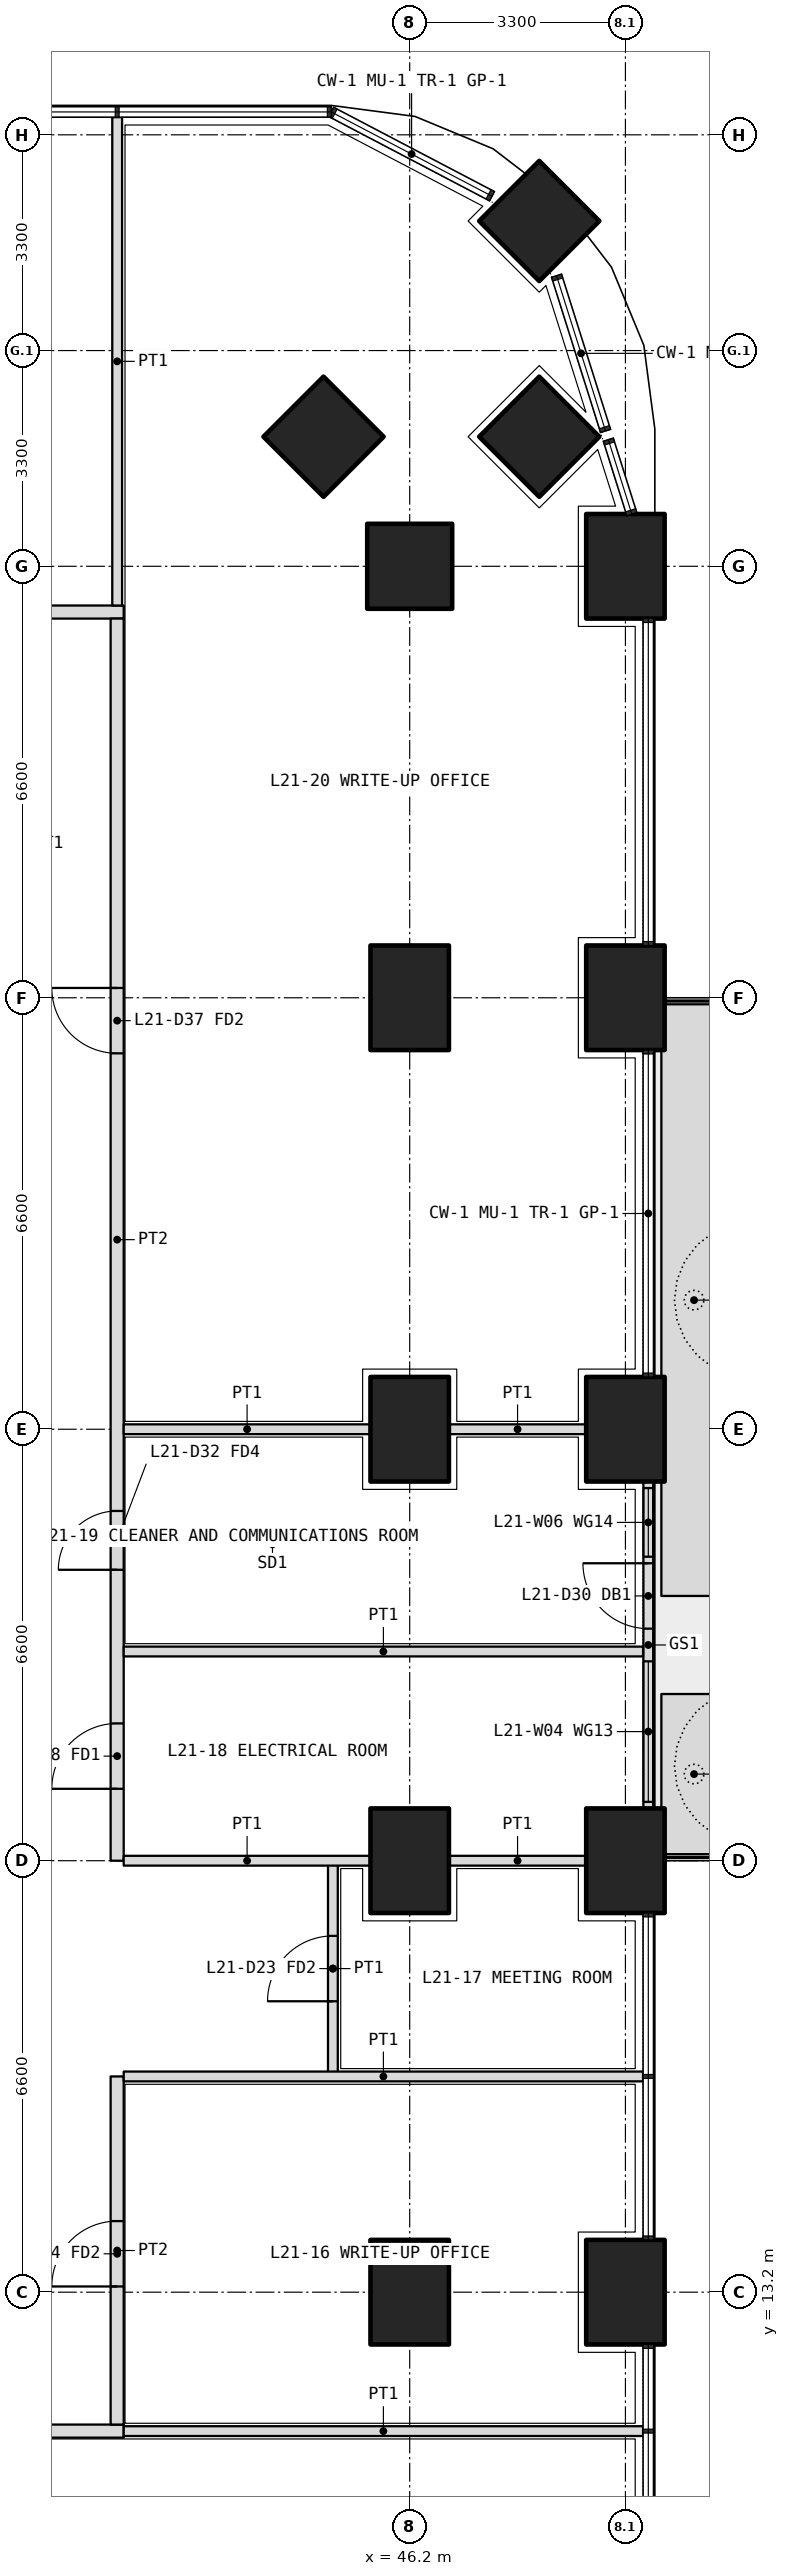
"""IFC4 building model, lengths in metres.
Left out: names, types, materials, properties, quantities, classifications, styles, units other than length and angle.
Written with IfcOpenShell. Run it as: python <this file> out.ifc"""

import sys

from ifc_helpers import new_model, si_unit, direction, frame, frame_2d, origin, origin_2d, place, context, subcontext, project, spatial, polyline, rectangle, outline, extrude, element, fill, save


model = new_model("IFC4")
c1 = context("Model", 3, precision=1e-05, world=origin(), true_north=direction((0.0, 1.0)))
c2 = subcontext(c1, "Body", "Model", "MODEL_VIEW")
j1 = project(units=[si_unit("LENGTHUNIT", "METRE"), si_unit("PLANEANGLEUNIT", "RADIAN")], contexts=[c1])
p1 = place(None, origin())
s1 = spatial("IfcSite", under=j1, at=p1, CompositionType="ELEMENT")
p2 = place(p1, origin())
s2 = spatial("IfcBuilding", under=s1, at=p2, CompositionType="ELEMENT")
p3 = place(p2, frame((0.0, 0.0, 94.8)))
s3 = spatial("IfcBuildingStorey", under=s2, at=p3, CompositionType="ELEMENT", Elevation=94.8)
p4 = place(p3, frame((48.182, 44.882, 0.0), z_axis=(0.0, 0.0, 1.0), x_axis=(0.707106781187, 0.707106781187, 0.0)))
e1 = element("IfcColumn", 1, at=p4, inside=s3, PredefinedType="COLUMN", context=c2, shape_type="SweptSolid", body=[
    extrude(rectangle(XDim=1.3, YDim=1.3, at=origin_2d()), origin(), (0.0, 0.0, 1.0), 4.2),
])
for number, where, z_axis, x_axis in (
    (2, (49.5, 13.2, 0.0), (0.0, 0.0, 1.0), (0.0, 1.0, 0.0)),
    (3, (49.5, 19.8, 0.0), (0.0, 0.0, 1.0), (0.0, 1.0, 0.0)),
    (4, (49.5, 26.4, 0.0), (0.0, 0.0, 1.0), (0.0, 1.0, 0.0)),
    (5, (49.5, 33.0, 0.0), (0.0, 0.0, 1.0), (0.0, 1.0, 0.0)),
    (6, (49.5, 39.6, 0.0), (0.0, 0.0, 1.0), (0.0, 1.0, 0.0)),
):
    element("IfcColumn", number, at=place(p3, frame(where, z_axis=z_axis, x_axis=x_axis)), inside=s3, PredefinedType="COLUMN", context=c2, shape_type="SweptSolid", body=[
        extrude(rectangle(XDim=1.6, YDim=1.2, at=origin_2d()), origin(), (0.0, 0.0, 1.0), 4.2),
    ])
for number, where, z_axis, x_axis in (
    (7, (46.2, 39.6, 0.0), (0.0, 0.0, 1.0), (1.0, 0.0, 0.0)),
    (8, (48.182, 41.582, 0.0), (0.0, 0.0, 1.0), (0.707, 0.707, 0.0)),
    (9, (44.882, 41.582, 0.0), (0.0, 0.0, 1.0), (0.707, 0.707, 0.0)),
):
    element("IfcColumn", number, at=place(p3, frame(where, z_axis=z_axis, x_axis=x_axis)), inside=s3, PredefinedType="COLUMN", context=c2, shape_type="SweptSolid", body=[
        extrude(rectangle(XDim=1.3, YDim=1.3, at=origin_2d()), origin(), (0.0, 0.0, 1.0), 4.2),
    ])
for number, where, z_axis, x_axis in (
    (10, (46.2, 13.2, 0.0), (0.0, 0.0, 1.0), (0.0, 1.0, 0.0)),
    (11, (46.2, 19.8, 0.0), (0.0, 0.0, 1.0), (0.0, 1.0, 0.0)),
    (12, (46.2, 26.4, 0.0), (0.0, 0.0, 1.0), (0.0, 1.0, 0.0)),
    (13, (46.2, 33.0, 0.0), (0.0, 0.0, 1.0), (0.0, 1.0, 0.0)),
):
    element("IfcColumn", number, at=place(p3, frame(where, z_axis=z_axis, x_axis=x_axis)), inside=s3, PredefinedType="COLUMN", context=c2, shape_type="SweptSolid", body=[
        extrude(rectangle(XDim=1.6, YDim=1.2, at=origin_2d()), origin(), (0.0, 0.0, 1.0), 4.2),
    ])
p5 = place(p3, origin())
e14 = element("IfcWall", 14, at=p5, inside=s3, PredefinedType="USERDEFINED", context=c2, shape_type="SweptSolid", body=[
    extrude(outline(polyline([(50.05, 19.9), (51.05, 19.9), (51.05, 22.35), (50.05, 22.35), (50.05, 19.9)]), holes=[polyline([(50.2, 20.05), (50.9, 20.05), (50.9, 22.2), (50.2, 22.2), (50.2, 20.05)])]), origin(), (0.0, 0.0, 1.0), 1.05),
])
p6 = place(p3, origin())
e15 = element("IfcWall", 15, at=p6, inside=s3, PredefinedType="USERDEFINED", context=c2, shape_type="SweptSolid", body=[
    extrude(outline(polyline([(50.05, 23.85), (51.05, 23.85), (51.05, 32.9), (50.05, 32.9), (50.05, 23.85)]), holes=[polyline([(50.2, 24.0), (50.9, 24.0), (50.9, 32.75), (50.2, 32.75), (50.2, 24.0)])]), origin(), (0.0, 0.0, 1.0), 1.05),
])
p7 = place(p3, frame((49.85, 20.6, 0.0), z_axis=(0.0, 0.0, 1.0), x_axis=(0.0, 1.0, 0.0)))
e16 = element("IfcWall", 16, at=p7, inside=s3, PredefinedType="SOLIDWALL", context=c2, shape_type="SweptSolid", body=[
    extrude(rectangle(XDim=5.0, YDim=0.15, at=frame_2d((2.5, 0.0))), origin(), (0.0, 0.0, 1.0), 2.7),
])
p8 = place(p7, frame((2.75, 0.0, 0.0)))
e17 = element("IfcOpeningElement", 17, at=p8, cuts=e16, PredefinedType="OPENING", context=c2, shape_type="SweptSolid", body=[
    extrude(rectangle(XDim=1.0, YDim=2.4, at=frame_2d((0.5, 1.2))), frame((0.0, 0.085, 0.0), z_axis=(0.0, -1.0, 0.0), x_axis=(1.0, 0.0, 0.0)), (0.0, 0.0, 1.0), 0.17),
])
p9 = place(p7, frame((0.1, 0.0, 0.1)))
e18 = element("IfcOpeningElement", 18, at=p9, cuts=e16, PredefinedType="OPENING", context=c2, shape_type="SweptSolid", body=[
    extrude(rectangle(XDim=2.15, YDim=2.3, at=frame_2d((1.075, 1.15))), frame((0.0, 0.085, 0.0), z_axis=(0.0, -1.0, 0.0), x_axis=(1.0, 0.0, 0.0)), (0.0, 0.0, 1.0), 0.17),
])
p10 = place(p7, frame((3.85, 0.0, 0.1)))
e19 = element("IfcOpeningElement", 19, at=p10, cuts=e16, PredefinedType="OPENING", context=c2, shape_type="SweptSolid", body=[
    extrude(rectangle(XDim=1.05, YDim=2.3, at=frame_2d((0.525, 1.15))), frame((0.0, 0.085, 0.0), z_axis=(0.0, -1.0, 0.0), x_axis=(1.0, 0.0, 0.0)), (0.0, 0.0, 1.0), 0.17),
])
p11 = place(p3, frame((10.975, 11.075, 0.0), z_axis=(0.0, 0.0, 1.0), x_axis=(1.0, 0.0, 0.0)))
e20 = element("IfcWall", 20, at=p11, inside=s3, PredefinedType="PARTITIONING", context=c2, shape_type="SweptSolid", body=[
    extrude(rectangle(XDim=30.85, YDim=0.2, at=frame_2d((15.425, 0.0))), origin(), (0.0, 0.0, 1.0), 2.85),
])
p12 = place(p11, frame((0.663, 0.0, 0.0)))
e21 = element("IfcOpeningElement", 21, at=p12, cuts=e20, PredefinedType="OPENING", context=c2, shape_type="SweptSolid", body=[
    extrude(rectangle(XDim=1.0, YDim=2.1, at=frame_2d((0.5, 1.05))), frame((0.0, 0.11, 0.0), z_axis=(0.0, -1.0, 0.0), x_axis=(1.0, 0.0, 0.0)), (0.0, 0.0, 1.0), 0.22),
])
p13 = place(p11, frame((3.275, 0.0, 0.0)))
e22 = element("IfcOpeningElement", 22, at=p13, cuts=e20, PredefinedType="OPENING", context=c2, shape_type="SweptSolid", body=[
    extrude(rectangle(XDim=1.2, YDim=2.1, at=frame_2d((0.6, 1.05))), frame((0.0, 0.11, 0.0), z_axis=(0.0, -1.0, 0.0), x_axis=(1.0, 0.0, 0.0)), (0.0, 0.0, 1.0), 0.22),
])
p14 = place(p11, frame((8.325, 0.0, 0.0)))
e23 = element("IfcOpeningElement", 23, at=p14, cuts=e20, PredefinedType="OPENING", context=c2, shape_type="SweptSolid", body=[
    extrude(rectangle(XDim=1.0, YDim=2.1, at=frame_2d((0.5, 1.05))), frame((0.0, 0.11, 0.0), z_axis=(0.0, -1.0, 0.0), x_axis=(1.0, 0.0, 0.0)), (0.0, 0.0, 1.0), 0.22),
])
p15 = place(p11, frame((13.275, 0.0, 0.0)))
e24 = element("IfcOpeningElement", 24, at=p15, cuts=e20, PredefinedType="OPENING", context=c2, shape_type="SweptSolid", body=[
    extrude(rectangle(XDim=1.0, YDim=2.1, at=frame_2d((0.5, 1.05))), frame((0.0, 0.11, 0.0), z_axis=(0.0, -1.0, 0.0), x_axis=(1.0, 0.0, 0.0)), (0.0, 0.0, 1.0), 0.22),
])
p16 = place(p11, frame((16.625, 0.0, 0.0)))
e25 = element("IfcOpeningElement", 25, at=p16, cuts=e20, PredefinedType="OPENING", context=c2, shape_type="SweptSolid", body=[
    extrude(rectangle(XDim=1.0, YDim=2.1, at=frame_2d((0.5, 1.05))), frame((0.0, 0.11, 0.0), z_axis=(0.0, -1.0, 0.0), x_axis=(1.0, 0.0, 0.0)), (0.0, 0.0, 1.0), 0.22),
])
p17 = place(p11, frame((19.925, 0.0, 0.0)))
e26 = element("IfcOpeningElement", 26, at=p17, cuts=e20, PredefinedType="OPENING", context=c2, shape_type="SweptSolid", body=[
    extrude(rectangle(XDim=1.0, YDim=2.1, at=frame_2d((0.5, 1.05))), frame((0.0, 0.11, 0.0), z_axis=(0.0, -1.0, 0.0), x_axis=(1.0, 0.0, 0.0)), (0.0, 0.0, 1.0), 0.22),
])
p18 = place(p11, frame((25.887, 0.0, 0.0)))
e27 = element("IfcOpeningElement", 27, at=p18, cuts=e20, PredefinedType="OPENING", context=c2, shape_type="SweptSolid", body=[
    extrude(rectangle(XDim=1.0, YDim=2.1, at=frame_2d((0.5, 1.05))), frame((0.0, 0.11, 0.0), z_axis=(0.0, -1.0, 0.0), x_axis=(1.0, 0.0, 0.0)), (0.0, 0.0, 1.0), 0.22),
])
p19 = place(p3, frame((10.975, 38.9, 0.0), z_axis=(0.0, 0.0, 1.0), x_axis=(1.0, 0.0, 0.0)))
e28 = element("IfcWall", 28, at=p19, inside=s3, PredefinedType="PARTITIONING", context=c2, shape_type="SweptSolid", body=[
    extrude(rectangle(XDim=30.85, YDim=0.2, at=frame_2d((15.425, 0.0))), origin(), (0.0, 0.0, 1.0), 2.85),
])
p20 = place(p19, frame((5.613, 0.0, 0.0)))
e29 = element("IfcOpeningElement", 29, at=p20, cuts=e28, PredefinedType="OPENING", context=c2, shape_type="SweptSolid", body=[
    extrude(rectangle(XDim=1.0, YDim=2.1, at=frame_2d((0.5, 1.05))), frame((0.0, 0.11, 0.0), z_axis=(0.0, -1.0, 0.0), x_axis=(1.0, 0.0, 0.0)), (0.0, 0.0, 1.0), 0.22),
])
p21 = place(p19, frame((16.575, 0.0, 0.0)))
e30 = element("IfcOpeningElement", 30, at=p21, cuts=e28, PredefinedType="OPENING", context=c2, shape_type="SweptSolid", body=[
    extrude(rectangle(XDim=1.0, YDim=2.1, at=frame_2d((0.5, 1.05))), frame((0.0, 0.11, 0.0), z_axis=(0.0, -1.0, 0.0), x_axis=(1.0, 0.0, 0.0)), (0.0, 0.0, 1.0), 0.22),
])
p22 = place(p19, frame((23.175, 0.0, 0.0)))
e31 = element("IfcOpeningElement", 31, at=p22, cuts=e28, PredefinedType="OPENING", context=c2, shape_type="SweptSolid", body=[
    extrude(rectangle(XDim=1.0, YDim=2.1, at=frame_2d((0.5, 1.05))), frame((0.0, 0.11, 0.0), z_axis=(0.0, -1.0, 0.0), x_axis=(1.0, 0.0, 0.0)), (0.0, 0.0, 1.0), 0.22),
])
p23 = place(p19, frame((27.538, 0.0, 0.0)))
e32 = element("IfcOpeningElement", 32, at=p23, cuts=e28, PredefinedType="OPENING", context=c2, shape_type="SweptSolid", body=[
    extrude(rectangle(XDim=1.0, YDim=2.1, at=frame_2d((0.5, 1.05))), frame((0.0, 0.11, 0.0), z_axis=(0.0, -1.0, 0.0), x_axis=(1.0, 0.0, 0.0)), (0.0, 0.0, 1.0), 0.22),
])
p24 = place(p3, frame((41.725, 11.175, 0.0), z_axis=(0.0, 0.0, 1.0), x_axis=(0.0, 1.0, 0.0)))
e33 = element("IfcWall", 33, at=p24, inside=s3, PredefinedType="PARTITIONING", context=c2, shape_type="SweptSolid", body=[
    extrude(rectangle(XDim=5.325, YDim=0.2, at=frame_2d((2.663, 0.0))), origin(), (0.0, 0.0, 1.0), 2.85),
])
p25 = place(p24, frame((2.113, 0.0, 0.0)))
e34 = element("IfcOpeningElement", 34, at=p25, cuts=e33, PredefinedType="OPENING", context=c2, shape_type="SweptSolid", body=[
    extrude(rectangle(XDim=1.0, YDim=2.1, at=frame_2d((0.5, 1.05))), frame((0.0, 0.11, 0.0), z_axis=(0.0, -1.0, 0.0), x_axis=(1.0, 0.0, 0.0)), (0.0, 0.0, 1.0), 0.22),
])
p26 = place(p3, frame((41.725, 19.8, 0.0), z_axis=(0.0, 0.0, 1.0), x_axis=(0.0, 1.0, 0.0)))
e35 = element("IfcWall", 35, at=p26, inside=s3, PredefinedType="PARTITIONING", context=c2, shape_type="SweptSolid", body=[
    extrude(rectangle(XDim=19.0, YDim=0.2, at=frame_2d((9.5, 0.0))), origin(), (0.0, 0.0, 1.0), 2.85),
])
p27 = place(p26, frame((1.1, 0.0, 0.0)))
e36 = element("IfcOpeningElement", 36, at=p27, cuts=e35, PredefinedType="OPENING", context=c2, shape_type="SweptSolid", body=[
    extrude(rectangle(XDim=1.0, YDim=2.1, at=frame_2d((0.5, 1.05))), frame((0.0, 0.11, 0.0), z_axis=(0.0, -1.0, 0.0), x_axis=(1.0, 0.0, 0.0)), (0.0, 0.0, 1.0), 0.22),
])
p28 = place(p26, frame((4.45, 0.0, 0.0)))
e37 = element("IfcOpeningElement", 37, at=p28, cuts=e35, PredefinedType="OPENING", context=c2, shape_type="SweptSolid", body=[
    extrude(rectangle(XDim=0.9, YDim=2.1, at=frame_2d((0.45, 1.05))), frame((0.0, 0.11, 0.0), z_axis=(0.0, -1.0, 0.0), x_axis=(1.0, 0.0, 0.0)), (0.0, 0.0, 1.0), 0.22),
])
p29 = place(p26, frame((12.35, 0.0, 0.0)))
e38 = element("IfcOpeningElement", 38, at=p29, cuts=e35, PredefinedType="OPENING", context=c2, shape_type="SweptSolid", body=[
    extrude(rectangle(XDim=1.0, YDim=2.1, at=frame_2d((0.5, 1.05))), frame((0.0, 0.11, 0.0), z_axis=(0.0, -1.0, 0.0), x_axis=(1.0, 0.0, 0.0)), (0.0, 0.0, 1.0), 0.22),
])
p30 = place(p3, frame((49.77, 11.075, 0.0), z_axis=(0.0, 0.0, 1.0), x_axis=(-1.0, 0.0, 0.0)))
e39 = element("IfcWall", 39, at=p30, inside=s3, PredefinedType="PARTITIONING", context=c2, shape_type="SweptSolid", body=[
    extrude(rectangle(XDim=7.945, YDim=0.15, at=frame_2d((3.973, 0.0))), origin(), (0.0, 0.0, 1.0), 2.7),
])
p31 = place(p3, frame((41.725, 46.47, 0.0), z_axis=(0.0, 0.0, 1.0), x_axis=(0.0, -1.0, 0.0)))
e40 = element("IfcWall", 40, at=p31, inside=s3, PredefinedType="PARTITIONING", context=c2, shape_type="SweptSolid", body=[
    extrude(rectangle(XDim=7.47, YDim=0.15, at=frame_2d((3.735, 0.0))), origin(), (0.0, 0.0, 1.0), 2.7),
])
p32 = place(p3, frame((45.025, 16.5, 0.0), z_axis=(0.0, 0.0, 1.0), x_axis=(0.0, 1.0, 0.0)))
e41 = element("IfcWall", 41, at=p32, inside=s3, PredefinedType="PARTITIONING", context=c2, shape_type="SweptSolid", body=[
    extrude(rectangle(XDim=3.3, YDim=0.15, at=frame_2d((1.65, 0.0))), origin(), (0.0, 0.0, 1.0), 2.85),
])
p33 = place(p32, frame((1.15, 0.0, 0.0)))
e42 = element("IfcOpeningElement", 42, at=p33, cuts=e41, PredefinedType="OPENING", context=c2, shape_type="SweptSolid", body=[
    extrude(rectangle(XDim=1.0, YDim=2.1, at=frame_2d((0.5, 1.05))), frame((0.0, 0.085, 0.0), z_axis=(0.0, -1.0, 0.0), x_axis=(1.0, 0.0, 0.0)), (0.0, 0.0, 1.0), 0.17),
])
p34 = place(p3, frame((49.77, 23.0, 0.0), z_axis=(0.0, 0.0, 1.0), x_axis=(-1.0, 0.0, 0.0)))
e43 = element("IfcWall", 43, at=p34, inside=s3, PredefinedType="PARTITIONING", context=c2, shape_type="SweptSolid", body=[
    extrude(rectangle(XDim=7.945, YDim=0.15, at=frame_2d((3.973, 0.0))), origin(), (0.0, 0.0, 1.0), 2.7),
])
p35 = place(p3, frame((48.9, 26.4, 0.0), z_axis=(0.0, 0.0, 1.0), x_axis=(-1.0, 0.0, 0.0)))
e44 = element("IfcWall", 44, at=p35, inside=s3, PredefinedType="PARTITIONING", context=c2, shape_type="SweptSolid", body=[
    extrude(rectangle(XDim=2.1, YDim=0.15, at=frame_2d((1.05, 0.0))), origin(), (0.0, 0.0, 1.0), 2.85),
])
p36 = place(p3, frame((45.6, 26.4, 0.0), z_axis=(0.0, 0.0, 1.0), x_axis=(-1.0, 0.0, 0.0)))
e45 = element("IfcWall", 45, at=p36, inside=s3, PredefinedType="PARTITIONING", context=c2, shape_type="SweptSolid", body=[
    extrude(rectangle(XDim=3.775, YDim=0.15, at=frame_2d((1.888, 0.0))), origin(), (0.0, 0.0, 1.0), 2.85),
])
p37 = place(p3, frame((49.77, 16.5, 0.0), z_axis=(0.0, 0.0, 1.0), x_axis=(-1.0, 0.0, 0.0)))
e46 = element("IfcWall", 46, at=p37, inside=s3, PredefinedType="PARTITIONING", context=c2, shape_type="SweptSolid", body=[
    extrude(rectangle(XDim=7.945, YDim=0.15, at=frame_2d((3.973, 0.0))), origin(), (0.0, 0.0, 1.0), 2.7),
])
p38 = place(p3, frame((48.9, 19.8, 0.0), z_axis=(0.0, 0.0, 1.0), x_axis=(-1.0, 0.0, 0.0)))
e47 = element("IfcWall", 47, at=p38, inside=s3, PredefinedType="PARTITIONING", context=c2, shape_type="SweptSolid", body=[
    extrude(rectangle(XDim=2.1, YDim=0.15, at=frame_2d((1.05, 0.0))), origin(), (0.0, 0.0, 1.0), 2.85),
])
p39 = place(p3, frame((45.6, 19.8, 0.0), z_axis=(0.0, 0.0, 1.0), x_axis=(-1.0, 0.0, 0.0)))
e48 = element("IfcWall", 48, at=p39, inside=s3, PredefinedType="PARTITIONING", context=c2, shape_type="SweptSolid", body=[
    extrude(rectangle(XDim=3.775, YDim=0.15, at=frame_2d((1.888, 0.0))), origin(), (0.0, 0.0, 1.0), 2.85),
])
p40 = place(p8, origin())
e49 = element("IfcDoor", 49, at=p40, inside=s3, OperationType="SINGLE_SWING_RIGHT", PredefinedType="DOOR", context=c2, shape_type="SweptSolid", body=[
    extrude(rectangle(XDim=1.0, YDim=2.4, at=frame_2d((0.5, 1.2))), frame((0.0, 0.025, 0.0), z_axis=(0.0, -1.0, 0.0), x_axis=(1.0, 0.0, 0.0)), (0.0, 0.0, 1.0), 0.05),
])
fill(e17, e49)
p41 = place(p9, origin())
e50 = element("IfcWindow", 50, at=p41, inside=s3, PartitioningType="SINGLE_PANEL", PredefinedType="WINDOW", context=c2, shape_type="SweptSolid", body=[
    extrude(rectangle(XDim=2.15, YDim=2.3, at=frame_2d((1.075, 1.15))), frame((0.0, 0.03, 0.0), z_axis=(0.0, -1.0, 0.0), x_axis=(1.0, 0.0, 0.0)), (0.0, 0.0, 1.0), 0.06),
])
fill(e18, e50)
p42 = place(p10, origin())
e51 = element("IfcWindow", 51, at=p42, inside=s3, PartitioningType="SINGLE_PANEL", PredefinedType="WINDOW", context=c2, shape_type="SweptSolid", body=[
    extrude(rectangle(XDim=1.05, YDim=2.3, at=frame_2d((0.525, 1.15))), frame((0.0, 0.03, 0.0), z_axis=(0.0, -1.0, 0.0), x_axis=(1.0, 0.0, 0.0)), (0.0, 0.0, 1.0), 0.06),
])
fill(e19, e51)
p43 = place(p25, origin())
e52 = element("IfcDoor", 52, at=p43, inside=s3, OperationType="SINGLE_SWING_LEFT", PredefinedType="DOOR", context=c2, shape_type="SweptSolid", body=[
    extrude(rectangle(XDim=1.0, YDim=2.1, at=frame_2d((0.5, 1.05))), frame((0.0, 0.025, 0.0), z_axis=(0.0, -1.0, 0.0), x_axis=(1.0, 0.0, 0.0)), (0.0, 0.0, 1.0), 0.05),
])
fill(e34, e52)
p44 = place(p33, origin())
e53 = element("IfcDoor", 53, at=p44, inside=s3, OperationType="SINGLE_SWING_LEFT", PredefinedType="DOOR", context=c2, shape_type="SweptSolid", body=[
    extrude(rectangle(XDim=1.0, YDim=2.1, at=frame_2d((0.5, 1.05))), frame((0.0, 0.025, 0.0), z_axis=(0.0, -1.0, 0.0), x_axis=(1.0, 0.0, 0.0)), (0.0, 0.0, 1.0), 0.05),
])
fill(e42, e53)
p45 = place(p27, origin())
e54 = element("IfcDoor", 54, at=p45, inside=s3, OperationType="SINGLE_SWING_LEFT", PredefinedType="DOOR", context=c2, shape_type="SweptSolid", body=[
    extrude(rectangle(XDim=1.0, YDim=2.1, at=frame_2d((0.5, 1.05))), frame((0.0, 0.025, 0.0), z_axis=(0.0, -1.0, 0.0), x_axis=(1.0, 0.0, 0.0)), (0.0, 0.0, 1.0), 0.05),
])
fill(e36, e54)
p46 = place(p28, origin())
e55 = element("IfcDoor", 55, at=p46, inside=s3, OperationType="SINGLE_SWING_LEFT", PredefinedType="DOOR", context=c2, shape_type="SweptSolid", body=[
    extrude(rectangle(XDim=0.9, YDim=2.1, at=frame_2d((0.45, 1.05))), frame((0.0, 0.025, 0.0), z_axis=(0.0, -1.0, 0.0), x_axis=(1.0, 0.0, 0.0)), (0.0, 0.0, 1.0), 0.05),
])
fill(e37, e55)
p47 = place(p29, origin())
e56 = element("IfcDoor", 56, at=p47, inside=s3, OperationType="SINGLE_SWING_RIGHT", PredefinedType="DOOR", context=c2, shape_type="SweptSolid", body=[
    extrude(rectangle(XDim=1.0, YDim=2.1, at=frame_2d((0.5, 1.05))), frame((0.0, 0.025, 0.0), z_axis=(0.0, -1.0, 0.0), x_axis=(1.0, 0.0, 0.0)), (0.0, 0.0, 1.0), 0.05),
])
fill(e38, e56)
save(model, sys.argv[1])
